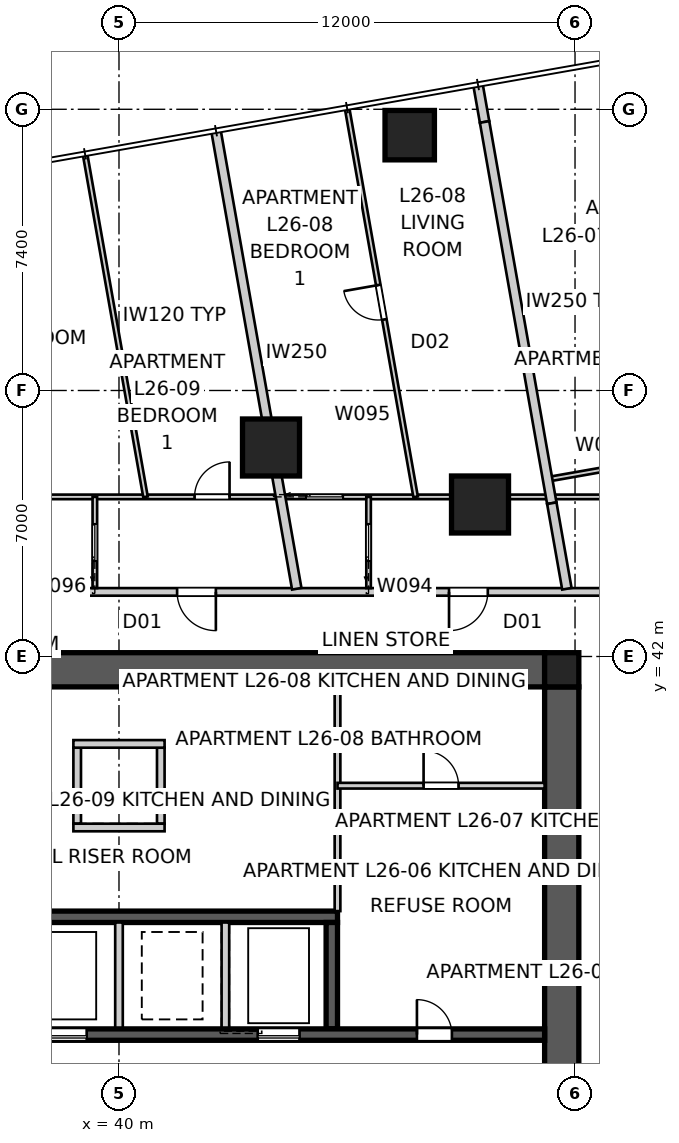
"""IFC4 building model, lengths in metres.
Left out: names, types, materials, properties, quantities, classifications, styles, units other than length and angle.
Written with IfcOpenShell. Run it as: python <this file> out.ifc"""

import sys

from ifc_helpers import new_model, si_unit, direction, frame, frame_2d, origin, origin_2d, place, context, subcontext, project, spatial, polyline, rectangle, outline, extrude, element, fill, save


model = new_model("IFC4")
c1 = context("Model", 3, precision=1e-05, world=origin(), true_north=direction((0.0, 1.0)))
c2 = subcontext(c1, "Body", "Model", "MODEL_VIEW")
j1 = project(units=[si_unit("LENGTHUNIT", "METRE"), si_unit("PLANEANGLEUNIT", "RADIAN")], contexts=[c1])
p1 = place(None, origin())
s1 = spatial("IfcSite", under=j1, at=p1, CompositionType="ELEMENT")
p2 = place(p1, origin())
s2 = spatial("IfcBuilding", under=s1, at=p2, CompositionType="ELEMENT")
p3 = place(p2, frame((0.0, 0.0, 96.4)))
s3 = spatial("IfcBuildingStorey", under=s2, at=p3, CompositionType="ELEMENT", Elevation=96.4)
p4 = place(p3, frame((28.8, 41.65, 0.0), z_axis=(0.0, 0.0, 1.0), x_axis=(1.0, 0.0, 0.0)))
e1 = element("IfcWall", 1, at=p4, inside=s3, PredefinedType="SHEAR", context=c2, shape_type="SweptSolid", body=[
    extrude(outline(polyline([(0.0, -0.45), (22.4, -0.45), (22.4, -0.025), (22.85, -0.025), (22.85, 0.025), (22.4, 0.025), (22.4, 0.45), (0.0, 0.45), (0.0, 0.025), (-0.45, 0.025), (-0.45, -0.025), (0.0, -0.025), (0.0, -0.45)])), origin(), (0.0, 0.0, 1.0), 3.4),
])
p5 = place(p3, frame((51.65, 18.8, 0.0), z_axis=(0.0, 0.0, 1.0), x_axis=(0.0, 1.0, 0.0)))
e2 = element("IfcWall", 2, at=p5, inside=s3, PredefinedType="SHEAR", context=c2, shape_type="SweptSolid", body=[
    extrude(outline(polyline([(0.0, -0.45), (22.4, -0.45), (22.4, -0.025), (22.85, -0.025), (22.85, 0.025), (22.4, 0.025), (22.4, 0.45), (0.0, 0.45), (0.0, 0.025), (-0.45, 0.025), (-0.45, -0.025), (0.0, -0.025), (0.0, -0.45)])), origin(), (0.0, 0.0, 1.0), 3.4),
])
p6 = place(p5, frame((11.14, 0.0, 0.0)))
e3 = element("IfcOpeningElement", 3, at=p6, cuts=e2, PredefinedType="OPENING", context=c2, shape_type="SweptSolid", body=[
    extrude(rectangle(XDim=1.02, YDim=2.4, at=frame_2d((0.51, 1.2))), frame((0.0, 0.46, 0.0), z_axis=(0.0, -1.0, 0.0), x_axis=(1.0, 0.0, 0.0)), (0.0, 0.0, 1.0), 0.92),
])
p7 = place(p3, frame((28.8, 32.05, 0.0), z_axis=(0.0, 0.0, 1.0), x_axis=(1.0, 0.0, 0.0)))
e4 = element("IfcWall", 4, at=p7, inside=s3, PredefinedType="SHEAR", context=c2, shape_type="SweptSolid", body=[
    extrude(rectangle(XDim=22.4, YDim=0.3, at=frame_2d((11.2, 0.0))), origin(), (0.0, 0.0, 1.0), 3.4),
])
p8 = place(p7, frame((19.04, 0.0, 0.0)))
e5 = element("IfcOpeningElement", 5, at=p8, cuts=e4, PredefinedType="OPENING", context=c2, shape_type="SweptSolid", body=[
    extrude(rectangle(XDim=0.92, YDim=2.1, at=frame_2d((0.46, 1.05))), frame((0.0, 0.16, 0.0), z_axis=(0.0, -1.0, 0.0), x_axis=(1.0, 0.0, 0.0)), (0.0, 0.0, 1.0), 0.32),
])
p9 = place(p7, frame((1.265, 0.0, 0.0)))
e6 = element("IfcOpeningElement", 6, at=p9, cuts=e4, PredefinedType="OPENING", context=c2, shape_type="SweptSolid", body=[
    extrude(rectangle(XDim=1.02, YDim=2.1, at=frame_2d((0.51, 1.05))), frame((0.0, 0.16, 0.0), z_axis=(0.0, -1.0, 0.0), x_axis=(1.0, 0.0, 0.0)), (0.0, 0.0, 1.0), 0.32),
])
p10 = place(p7, frame((4.015, 0.0, 0.0)))
e7 = element("IfcOpeningElement", 7, at=p10, cuts=e4, PredefinedType="OPENING", context=c2, shape_type="SweptSolid", body=[
    extrude(rectangle(XDim=0.92, YDim=2.1, at=frame_2d((0.46, 1.05))), frame((0.0, 0.16, 0.0), z_axis=(0.0, -1.0, 0.0), x_axis=(1.0, 0.0, 0.0)), (0.0, 0.0, 1.0), 0.32),
])
p11 = place(p7, frame((6.45, 0.0, 0.0)))
e8 = element("IfcOpeningElement", 8, at=p11, cuts=e4, PredefinedType="OPENING", context=c2, shape_type="SweptSolid", body=[
    extrude(rectangle(XDim=1.1, YDim=2.1, at=frame_2d((0.55, 1.05))), frame((0.0, 0.16, 0.0), z_axis=(0.0, -1.0, 0.0), x_axis=(1.0, 0.0, 0.0)), (0.0, 0.0, 1.0), 0.32),
])
p12 = place(p7, frame((9.25, 0.0, 0.0)))
e9 = element("IfcOpeningElement", 9, at=p12, cuts=e4, PredefinedType="OPENING", context=c2, shape_type="SweptSolid", body=[
    extrude(rectangle(XDim=1.1, YDim=2.1, at=frame_2d((0.55, 1.05))), frame((0.0, 0.16, 0.0), z_axis=(0.0, -1.0, 0.0), x_axis=(1.0, 0.0, 0.0)), (0.0, 0.0, 1.0), 0.32),
])
p13 = place(p7, frame((14.85, 0.0, 0.0)))
e10 = element("IfcOpeningElement", 10, at=p13, cuts=e4, PredefinedType="OPENING", context=c2, shape_type="SweptSolid", body=[
    extrude(rectangle(XDim=1.1, YDim=2.1, at=frame_2d((0.55, 1.05))), frame((0.0, 0.16, 0.0), z_axis=(0.0, -1.0, 0.0), x_axis=(1.0, 0.0, 0.0)), (0.0, 0.0, 1.0), 0.32),
])
p14 = place(p3, frame((34.25, 35.15, 0.0), z_axis=(0.0, 0.0, 1.0), x_axis=(1.0, 0.0, 0.0)))
e11 = element("IfcWall", 11, at=p14, inside=s3, PredefinedType="SHEAR", context=c2, shape_type="SweptSolid", body=[
    extrude(rectangle(XDim=11.5, YDim=0.3, at=frame_2d((5.75, 0.0))), origin(), (0.0, 0.0, 1.0), 3.4),
])
for number, where, z_axis, x_axis in (
    (12, (40.0, 32.2, 0.0), (0.0, 0.0, 1.0), (0.0, 1.0, 0.0)),
    (13, (42.8, 32.2, 0.0), (0.0, 0.0, 1.0), (0.0, 1.0, 0.0)),
):
    element("IfcWall", number, at=place(p3, frame(where, z_axis=z_axis, x_axis=x_axis)), inside=s3, PredefinedType="SOLIDWALL", context=c2, shape_type="SweptSolid", body=[
        extrude(rectangle(XDim=2.8, YDim=0.2, at=frame_2d((1.4, 0.0))), origin(), (0.0, 0.0, 1.0), 3.4),
    ])
p15 = place(p3, frame((45.6, 32.2, 0.0), z_axis=(0.0, 0.0, 1.0), x_axis=(0.0, 1.0, 0.0)))
e14 = element("IfcWall", 14, at=p15, inside=s3, PredefinedType="SHEAR", context=c2, shape_type="SweptSolid", body=[
    extrude(rectangle(XDim=2.8, YDim=0.3, at=frame_2d((1.4, 0.0))), origin(), (0.0, 0.0, 1.0), 3.4),
])
for number, where, z_axis, x_axis in (
    (15, (38.9, 37.6, 0.0), (0.0, 0.0, 1.0), (0.0, 1.0, 0.0)),
    (16, (41.1, 37.6, 0.0), (0.0, 0.0, 1.0), (0.0, 1.0, 0.0)),
):
    element("IfcWall", number, at=place(p3, frame(where, z_axis=z_axis, x_axis=x_axis)), inside=s3, PredefinedType="SOLIDWALL", context=c2, shape_type="SweptSolid", body=[
        extrude(rectangle(XDim=2.0, YDim=0.2, at=frame_2d((1.0, 0.0))), origin(), (0.0, 0.0, 1.0), 3.4),
    ])
for number, where, z_axis, x_axis in (
    (17, (38.8, 37.5, 0.0), (0.0, 0.0, 1.0), (1.0, 0.0, 0.0)),
    (18, (38.8, 39.7, 0.0), (0.0, 0.0, 1.0), (1.0, 0.0, 0.0)),
):
    element("IfcWall", number, at=place(p3, frame(where, z_axis=z_axis, x_axis=x_axis)), inside=s3, PredefinedType="SOLIDWALL", context=c2, shape_type="SweptSolid", body=[
        extrude(rectangle(XDim=2.4, YDim=0.2, at=frame_2d((1.2, 0.0))), origin(), (0.0, 0.0, 1.0), 3.4),
    ])
p16 = place(p3, frame((51.65, 41.65, 0.0), z_axis=(0.0, 0.0, 1.0), x_axis=(1.0, 0.0, 0.0)))
e19 = element("IfcColumn", 19, at=p16, inside=s3, PredefinedType="COLUMN", context=c2, shape_type="SweptSolid", body=[
    extrude(rectangle(XDim=0.9, YDim=0.9, at=origin_2d()), origin(), (0.0, 0.0, 1.0), 3.4),
])
p17 = place(p3, frame((47.65, 55.719, 0.0), z_axis=(0.0, 0.0, 1.0), x_axis=(1.0, 0.0, 0.0)))
e20 = element("IfcColumn", 20, at=p17, inside=s3, PredefinedType="COLUMN", context=c2, shape_type="SweptSolid", body=[
    extrude(rectangle(XDim=1.3, YDim=1.3, at=origin_2d()), origin(), (0.0, 0.0, 1.0), 3.4),
])
for number, where, z_axis, x_axis in (
    (21, (49.5, 46.0, 0.0), (0.0, 0.0, 1.0), (1.0, 0.0, 0.0)),
    (22, (44.0, 47.5, 0.0), (0.0, 0.0, 1.0), (1.0, 0.0, 0.0)),
):
    element("IfcColumn", number, at=place(p3, frame(where, z_axis=z_axis, x_axis=x_axis)), inside=s3, PredefinedType="COLUMN", context=c2, shape_type="SweptSolid", body=[
        extrude(rectangle(XDim=1.5, YDim=1.5, at=origin_2d()), origin(), (0.0, 0.0, 1.0), 3.4),
    ])
p18 = place(p3, frame((54.5, 43.7, 0.0), z_axis=(0.0, 0.0, 1.0), x_axis=(-1.0, 0.0, 0.0)))
e23 = element("IfcWall", 23, at=p18, inside=s3, PredefinedType="PARTITIONING", context=c2, shape_type="SweptSolid", body=[
    extrude(rectangle(XDim=29.0, YDim=0.2, at=frame_2d((14.5, 0.0))), origin(), (0.0, 0.0, 1.0), 3.25),
])
p19 = place(p18, frame((11.951, 0.0, 0.0)))
e24 = element("IfcOpeningElement", 24, at=p19, cuts=e23, PredefinedType="OPENING", context=c2, shape_type="SweptSolid", body=[
    extrude(rectangle(XDim=1.02, YDim=2.34, at=frame_2d((0.51, 1.17))), frame((0.0, 0.11, 0.0), z_axis=(0.0, -1.0, 0.0), x_axis=(1.0, 0.0, 0.0)), (0.0, 0.0, 1.0), 0.22),
])
p20 = place(p18, frame((4.795, 0.0, 0.0)))
e25 = element("IfcOpeningElement", 25, at=p20, cuts=e23, PredefinedType="OPENING", context=c2, shape_type="SweptSolid", body=[
    extrude(rectangle(XDim=1.02, YDim=2.34, at=frame_2d((0.51, 1.17))), frame((0.0, 0.11, 0.0), z_axis=(0.0, -1.0, 0.0), x_axis=(1.0, 0.0, 0.0)), (0.0, 0.0, 1.0), 0.22),
])
p21 = place(p3, frame((42.552, 55.836, 0.0), z_axis=(0.0, 0.0, 1.0), x_axis=(0.173639677872, -0.984809251718, 0.0)))
e26 = element("IfcWall", 26, at=p21, inside=s3, PredefinedType="PARTITIONING", context=c2, shape_type="SweptSolid", body=[
    extrude(rectangle(XDim=12.24, YDim=0.25, at=frame_2d((6.12, 0.0))), origin(), (0.0, 0.0, 1.0), 3.25),
])
p22 = place(p3, frame((49.446, 57.051, 0.0), z_axis=(0.0, 0.0, 1.0), x_axis=(0.173813186416, -0.984778643263, 0.0)))
e27 = element("IfcWall", 27, at=p22, inside=s3, PredefinedType="PARTITIONING", context=c2, shape_type="SweptSolid", body=[
    extrude(rectangle(XDim=1.0, YDim=0.25, at=frame_2d((0.5, 0.0))), origin(), (0.0, 0.0, 1.0), 3.25),
])
p23 = place(p3, frame((49.62, 56.066, 0.0), z_axis=(0.0, 0.0, 1.0), x_axis=(0.173644522411, -0.984808397525, 0.0)))
e28 = element("IfcWall", 28, at=p23, inside=s3, PredefinedType="PARTITIONING", context=c2, shape_type="SweptSolid", body=[
    extrude(rectangle(XDim=10.188, YDim=0.25, at=frame_2d((5.094, 0.0))), origin(), (0.0, 0.0, 1.0), 2.638),
])
p24 = place(p3, frame((51.389, 46.033, 0.0), z_axis=(0.0, 0.0, 1.0), x_axis=(0.173657387043, -0.984806129106, 0.0)))
e29 = element("IfcWall", 29, at=p24, inside=s3, PredefinedType="PARTITIONING", context=c2, shape_type="SweptSolid", body=[
    extrude(rectangle(XDim=2.286, YDim=0.25, at=frame_2d((1.143, 0.0))), origin(), (0.0, 0.0, 1.0), 3.25),
])
p25 = place(p3, frame((45.75, 41.2, 0.0), z_axis=(0.0, 0.0, 1.0), x_axis=(0.0, -1.0, 0.0)))
e30 = element("IfcWall", 30, at=p25, inside=s3, PredefinedType="SOLIDWALL", context=c2, shape_type="SweptSolid", body=[
    extrude(rectangle(XDim=5.9, YDim=0.15, at=frame_2d((2.95, 0.0))), origin(), (0.0, 0.0, 1.0), 3.25),
])
p26 = place(p3, frame((45.75, 38.6, 0.0), z_axis=(0.0, 0.0, 1.0), x_axis=(1.0, 0.0, 0.0)))
e31 = element("IfcWall", 31, at=p26, inside=s3, PredefinedType="SOLIDWALL", context=c2, shape_type="SweptSolid", body=[
    extrude(rectangle(XDim=5.45, YDim=0.15, at=frame_2d((2.725, 0.0))), origin(), (0.0, 0.0, 1.0), 3.25),
])
p27 = place(p26, frame((2.265, 0.0, 0.0)))
e32 = element("IfcOpeningElement", 32, at=p27, cuts=e31, PredefinedType="OPENING", context=c2, shape_type="SweptSolid", body=[
    extrude(rectangle(XDim=0.92, YDim=2.1, at=frame_2d((0.46, 1.05))), frame((0.0, 0.085, 0.0), z_axis=(0.0, -1.0, 0.0), x_axis=(1.0, 0.0, 0.0)), (0.0, 0.0, 1.0), 0.17),
])
p28 = place(p3, frame((23.0, 46.2, 0.0), z_axis=(0.0, 0.0, 1.0), x_axis=(1.0, 0.0, 0.0)))
e33 = element("IfcWall", 33, at=p28, inside=s3, PredefinedType="PARTITIONING", context=c2, shape_type="SweptSolid", body=[
    extrude(rectangle(XDim=34.0, YDim=0.12, at=frame_2d((17.0, 0.0))), origin(), (0.0, 0.0, 1.0), 2.55),
])
p29 = place(p28, frame((18.989, 0.0, 0.0)))
e34 = element("IfcOpeningElement", 34, at=p29, cuts=e33, PredefinedType="OPENING", context=c2, shape_type="SweptSolid", body=[
    extrude(rectangle(XDim=0.92, YDim=2.34, at=frame_2d((0.46, 1.17))), frame((0.0, 0.07, 0.0), z_axis=(0.0, -1.0, 0.0), x_axis=(1.0, 0.0, 0.0)), (0.0, 0.0, 1.0), 0.14),
])
p30 = place(p28, frame((1.306, 0.0, 0.0)))
e35 = element("IfcOpeningElement", 35, at=p30, cuts=e33, PredefinedType="OPENING", context=c2, shape_type="SweptSolid", body=[
    extrude(rectangle(XDim=0.92, YDim=2.34, at=frame_2d((0.46, 1.17))), frame((0.0, 0.07, 0.0), z_axis=(0.0, -1.0, 0.0), x_axis=(1.0, 0.0, 0.0)), (0.0, 0.0, 1.0), 0.14),
])
p31 = place(p28, frame((13.884, 0.0, 0.0)))
e36 = element("IfcOpeningElement", 36, at=p31, cuts=e33, PredefinedType="OPENING", context=c2, shape_type="SweptSolid", body=[
    extrude(rectangle(XDim=0.96, YDim=2.1, at=frame_2d((0.48, 1.05))), frame((0.0, 0.07, 0.0), z_axis=(0.0, -1.0, 0.0), x_axis=(1.0, 0.0, 0.0)), (0.0, 0.0, 1.0), 0.14),
])
p32 = place(p28, frame((21.929, 0.0, 0.0)))
e37 = element("IfcOpeningElement", 37, at=p32, cuts=e33, PredefinedType="OPENING", context=c2, shape_type="SweptSolid", body=[
    extrude(rectangle(XDim=0.96, YDim=2.1, at=frame_2d((0.48, 1.05))), frame((0.0, 0.07, 0.0), z_axis=(0.0, -1.0, 0.0), x_axis=(1.0, 0.0, 0.0)), (0.0, 0.0, 1.0), 0.14),
])
p33 = place(p3, frame((58.172, 47.877, 0.0), z_axis=(0.0, 0.0, 1.0), x_axis=(-0.984806372973, -0.173656004074, 0.0)))
e38 = element("IfcWall", 38, at=p33, inside=s3, PredefinedType="PARTITIONING", context=c2, shape_type="SweptSolid", body=[
    extrude(rectangle(XDim=7.0, YDim=0.12, at=frame_2d((3.5, 0.0))), origin(), (0.0, 0.0, 1.0), 3.25),
])
p34 = place(p33, frame((2.89, 0.0, 0.0)))
e39 = element("IfcOpeningElement", 39, at=p34, cuts=e38, PredefinedType="OPENING", context=c2, shape_type="SweptSolid", body=[
    extrude(rectangle(XDim=0.92, YDim=2.34, at=frame_2d((0.46, 1.17))), frame((0.0, 0.07, 0.0), z_axis=(0.0, -1.0, 0.0), x_axis=(1.0, 0.0, 0.0)), (0.0, 0.0, 1.0), 0.14),
])
p35 = place(p3, frame((46.567, 43.8, 0.0), z_axis=(0.0, 0.0, 1.0), x_axis=(0.0, 1.0, 0.0)))
e40 = element("IfcWall", 40, at=p35, inside=s3, PredefinedType="PARTITIONING", context=c2, shape_type="SweptSolid", body=[
    extrude(rectangle(XDim=2.4, YDim=0.12, at=frame_2d((1.2, 0.0))), origin(), (0.0, 0.0, 1.0), 3.25),
])
p36 = place(p35, frame((0.72, 0.0, 0.0)))
e41 = element("IfcOpeningElement", 41, at=p36, cuts=e40, PredefinedType="OPENING", context=c2, shape_type="SweptSolid", body=[
    extrude(rectangle(XDim=0.96, YDim=2.1, at=frame_2d((0.48, 1.05))), frame((0.0, 0.07, 0.0), z_axis=(0.0, -1.0, 0.0), x_axis=(1.0, 0.0, 0.0)), (0.0, 0.0, 1.0), 0.14),
])
p37 = place(p3, frame((47.805, 46.2, 0.0), z_axis=(0.0, 0.0, 1.0), x_axis=(-0.173653605279, 0.984806795962, 0.0)))
e42 = element("IfcWall", 42, at=p37, inside=s3, PredefinedType="PARTITIONING", context=c2, shape_type="SweptSolid", body=[
    extrude(rectangle(XDim=10.362, YDim=0.12, at=frame_2d((5.181, 0.0))), origin(), (0.0, 0.0, 1.0), 3.25),
])
p38 = place(p37, frame((4.741, 0.0, 0.0)))
e43 = element("IfcOpeningElement", 43, at=p38, cuts=e42, PredefinedType="OPENING", context=c2, shape_type="SweptSolid", body=[
    extrude(rectangle(XDim=0.92, YDim=2.34, at=frame_2d((0.46, 1.17))), frame((0.0, 0.07, 0.0), z_axis=(0.0, -1.0, 0.0), x_axis=(1.0, 0.0, 0.0)), (0.0, 0.0, 1.0), 0.14),
])
p39 = place(p3, frame((39.365, 43.8, 0.0), z_axis=(0.0, 0.0, 1.0), x_axis=(0.0, 1.0, 0.0)))
e44 = element("IfcWall", 44, at=p39, inside=s3, PredefinedType="PARTITIONING", context=c2, shape_type="SweptSolid", body=[
    extrude(rectangle(XDim=2.4, YDim=0.12, at=frame_2d((1.2, 0.0))), origin(), (0.0, 0.0, 1.0), 3.25),
])
p40 = place(p39, frame((0.72, 0.0, 0.0)))
e45 = element("IfcOpeningElement", 45, at=p40, cuts=e44, PredefinedType="OPENING", context=c2, shape_type="SweptSolid", body=[
    extrude(rectangle(XDim=0.96, YDim=2.1, at=frame_2d((0.48, 1.05))), frame((0.0, 0.07, 0.0), z_axis=(0.0, -1.0, 0.0), x_axis=(1.0, 0.0, 0.0)), (0.0, 0.0, 1.0), 0.14),
])
p41 = place(p3, frame((39.113, 55.188, 0.0), z_axis=(0.0, 0.0, 1.0), x_axis=(0.173652576186, -0.984806977424, 0.0)))
e46 = element("IfcWall", 46, at=p41, inside=s3, PredefinedType="PARTITIONING", context=c2, shape_type="SweptSolid", body=[
    extrude(rectangle(XDim=9.127, YDim=0.12, at=frame_2d((4.563, 0.0))), origin(), (0.0, 0.0, 1.0), 3.25),
])
p42 = place(p8, origin())
e47 = element("IfcDoor", 47, at=p42, inside=s3, OperationType="SINGLE_SWING_LEFT", PredefinedType="DOOR", context=c2, shape_type="SweptSolid", body=[
    extrude(rectangle(XDim=0.92, YDim=2.1, at=frame_2d((0.46, 1.05))), frame((0.0, 0.025, 0.0), z_axis=(0.0, -1.0, 0.0), x_axis=(1.0, 0.0, 0.0)), (0.0, 0.0, 1.0), 0.05),
])
fill(e5, e47)
p43 = place(p19, origin())
e48 = element("IfcDoor", 48, at=p43, inside=s3, OperationType="SINGLE_SWING_LEFT", PredefinedType="DOOR", context=c2, shape_type="SweptSolid", body=[
    extrude(rectangle(XDim=1.02, YDim=2.34, at=frame_2d((0.51, 1.17))), frame((0.0, 0.025, 0.0), z_axis=(0.0, -1.0, 0.0), x_axis=(1.0, 0.0, 0.0)), (0.0, 0.0, 1.0), 0.05),
])
fill(e24, e48)
p44 = place(p20, origin())
e49 = element("IfcDoor", 49, at=p44, inside=s3, OperationType="SINGLE_SWING_RIGHT", PredefinedType="DOOR", context=c2, shape_type="SweptSolid", body=[
    extrude(rectangle(XDim=1.02, YDim=2.34, at=frame_2d((0.51, 1.17))), frame((0.0, 0.025, 0.0), z_axis=(0.0, -1.0, 0.0), x_axis=(1.0, 0.0, 0.0)), (0.0, 0.0, 1.0), 0.05),
])
fill(e25, e49)
p45 = place(p27, origin())
e50 = element("IfcDoor", 50, at=p45, inside=s3, OperationType="SINGLE_SWING_LEFT", PredefinedType="DOOR", context=c2, shape_type="SweptSolid", body=[
    extrude(rectangle(XDim=0.92, YDim=2.1, at=frame_2d((0.46, 1.05))), frame((0.0, 0.025, 0.0), z_axis=(0.0, -1.0, 0.0), x_axis=(1.0, 0.0, 0.0)), (0.0, 0.0, 1.0), 0.05),
])
fill(e32, e50)
p46 = place(p29, origin())
e51 = element("IfcDoor", 51, at=p46, inside=s3, OperationType="SINGLE_SWING_RIGHT", PredefinedType="DOOR", context=c2, shape_type="SweptSolid", body=[
    extrude(rectangle(XDim=0.92, YDim=2.34, at=frame_2d((0.46, 1.17))), frame((0.0, 0.025, 0.0), z_axis=(0.0, -1.0, 0.0), x_axis=(1.0, 0.0, 0.0)), (0.0, 0.0, 1.0), 0.05),
])
fill(e34, e51)
p47 = place(p40, origin())
e52 = element("IfcDoor", 52, at=p47, inside=s3, OperationType="SLIDING_TO_LEFT", PredefinedType="DOOR", context=c2, shape_type="SweptSolid", body=[
    extrude(rectangle(XDim=0.96, YDim=2.1, at=frame_2d((0.48, 1.05))), frame((0.0, 0.025, 0.0), z_axis=(0.0, -1.0, 0.0), x_axis=(1.0, 0.0, 0.0)), (0.0, 0.0, 1.0), 0.05),
])
fill(e45, e52)
p48 = place(p36, origin())
e53 = element("IfcDoor", 53, at=p48, inside=s3, OperationType="SLIDING_TO_LEFT", PredefinedType="DOOR", context=c2, shape_type="SweptSolid", body=[
    extrude(rectangle(XDim=0.96, YDim=2.1, at=frame_2d((0.48, 1.05))), frame((0.0, 0.025, 0.0), z_axis=(0.0, -1.0, 0.0), x_axis=(1.0, 0.0, 0.0)), (0.0, 0.0, 1.0), 0.05),
])
fill(e41, e53)
p49 = place(p32, origin())
e54 = element("IfcDoor", 54, at=p49, inside=s3, OperationType="SLIDING_TO_LEFT", PredefinedType="DOOR", context=c2, shape_type="SweptSolid", body=[
    extrude(rectangle(XDim=0.96, YDim=2.1, at=frame_2d((0.48, 1.05))), frame((0.0, 0.025, 0.0), z_axis=(0.0, -1.0, 0.0), x_axis=(1.0, 0.0, 0.0)), (0.0, 0.0, 1.0), 0.05),
])
fill(e37, e54)
p50 = place(p38, origin())
e55 = element("IfcDoor", 55, at=p50, inside=s3, OperationType="SINGLE_SWING_RIGHT", PredefinedType="DOOR", context=c2, shape_type="SweptSolid", body=[
    extrude(rectangle(XDim=0.92, YDim=2.34, at=frame_2d((0.46, 1.17))), frame((0.0, 0.025, 0.0), z_axis=(0.0, -1.0, 0.0), x_axis=(1.0, 0.0, 0.0)), (0.0, 0.0, 1.0), 0.05),
])
fill(e43, e55)
p51 = place(p12, origin())
e56 = element("IfcDoor", 56, at=p51, inside=s3, OperationType="SLIDING_TO_LEFT", PredefinedType="DOOR", context=c2, shape_type="SweptSolid", body=[
    extrude(rectangle(XDim=1.1, YDim=2.1, at=frame_2d((0.55, 1.05))), frame((0.0, 0.025, 0.0), z_axis=(0.0, -1.0, 0.0), x_axis=(1.0, 0.0, 0.0)), (0.0, 0.0, 1.0), 0.05),
])
fill(e9, e56)
p52 = place(p13, origin())
e57 = element("IfcDoor", 57, at=p52, inside=s3, OperationType="SLIDING_TO_LEFT", PredefinedType="DOOR", context=c2, shape_type="SweptSolid", body=[
    extrude(rectangle(XDim=1.1, YDim=2.1, at=frame_2d((0.55, 1.05))), frame((0.0, 0.025, 0.0), z_axis=(0.0, -1.0, 0.0), x_axis=(1.0, 0.0, 0.0)), (0.0, 0.0, 1.0), 0.05),
])
fill(e10, e57)
save(model, sys.argv[1])
